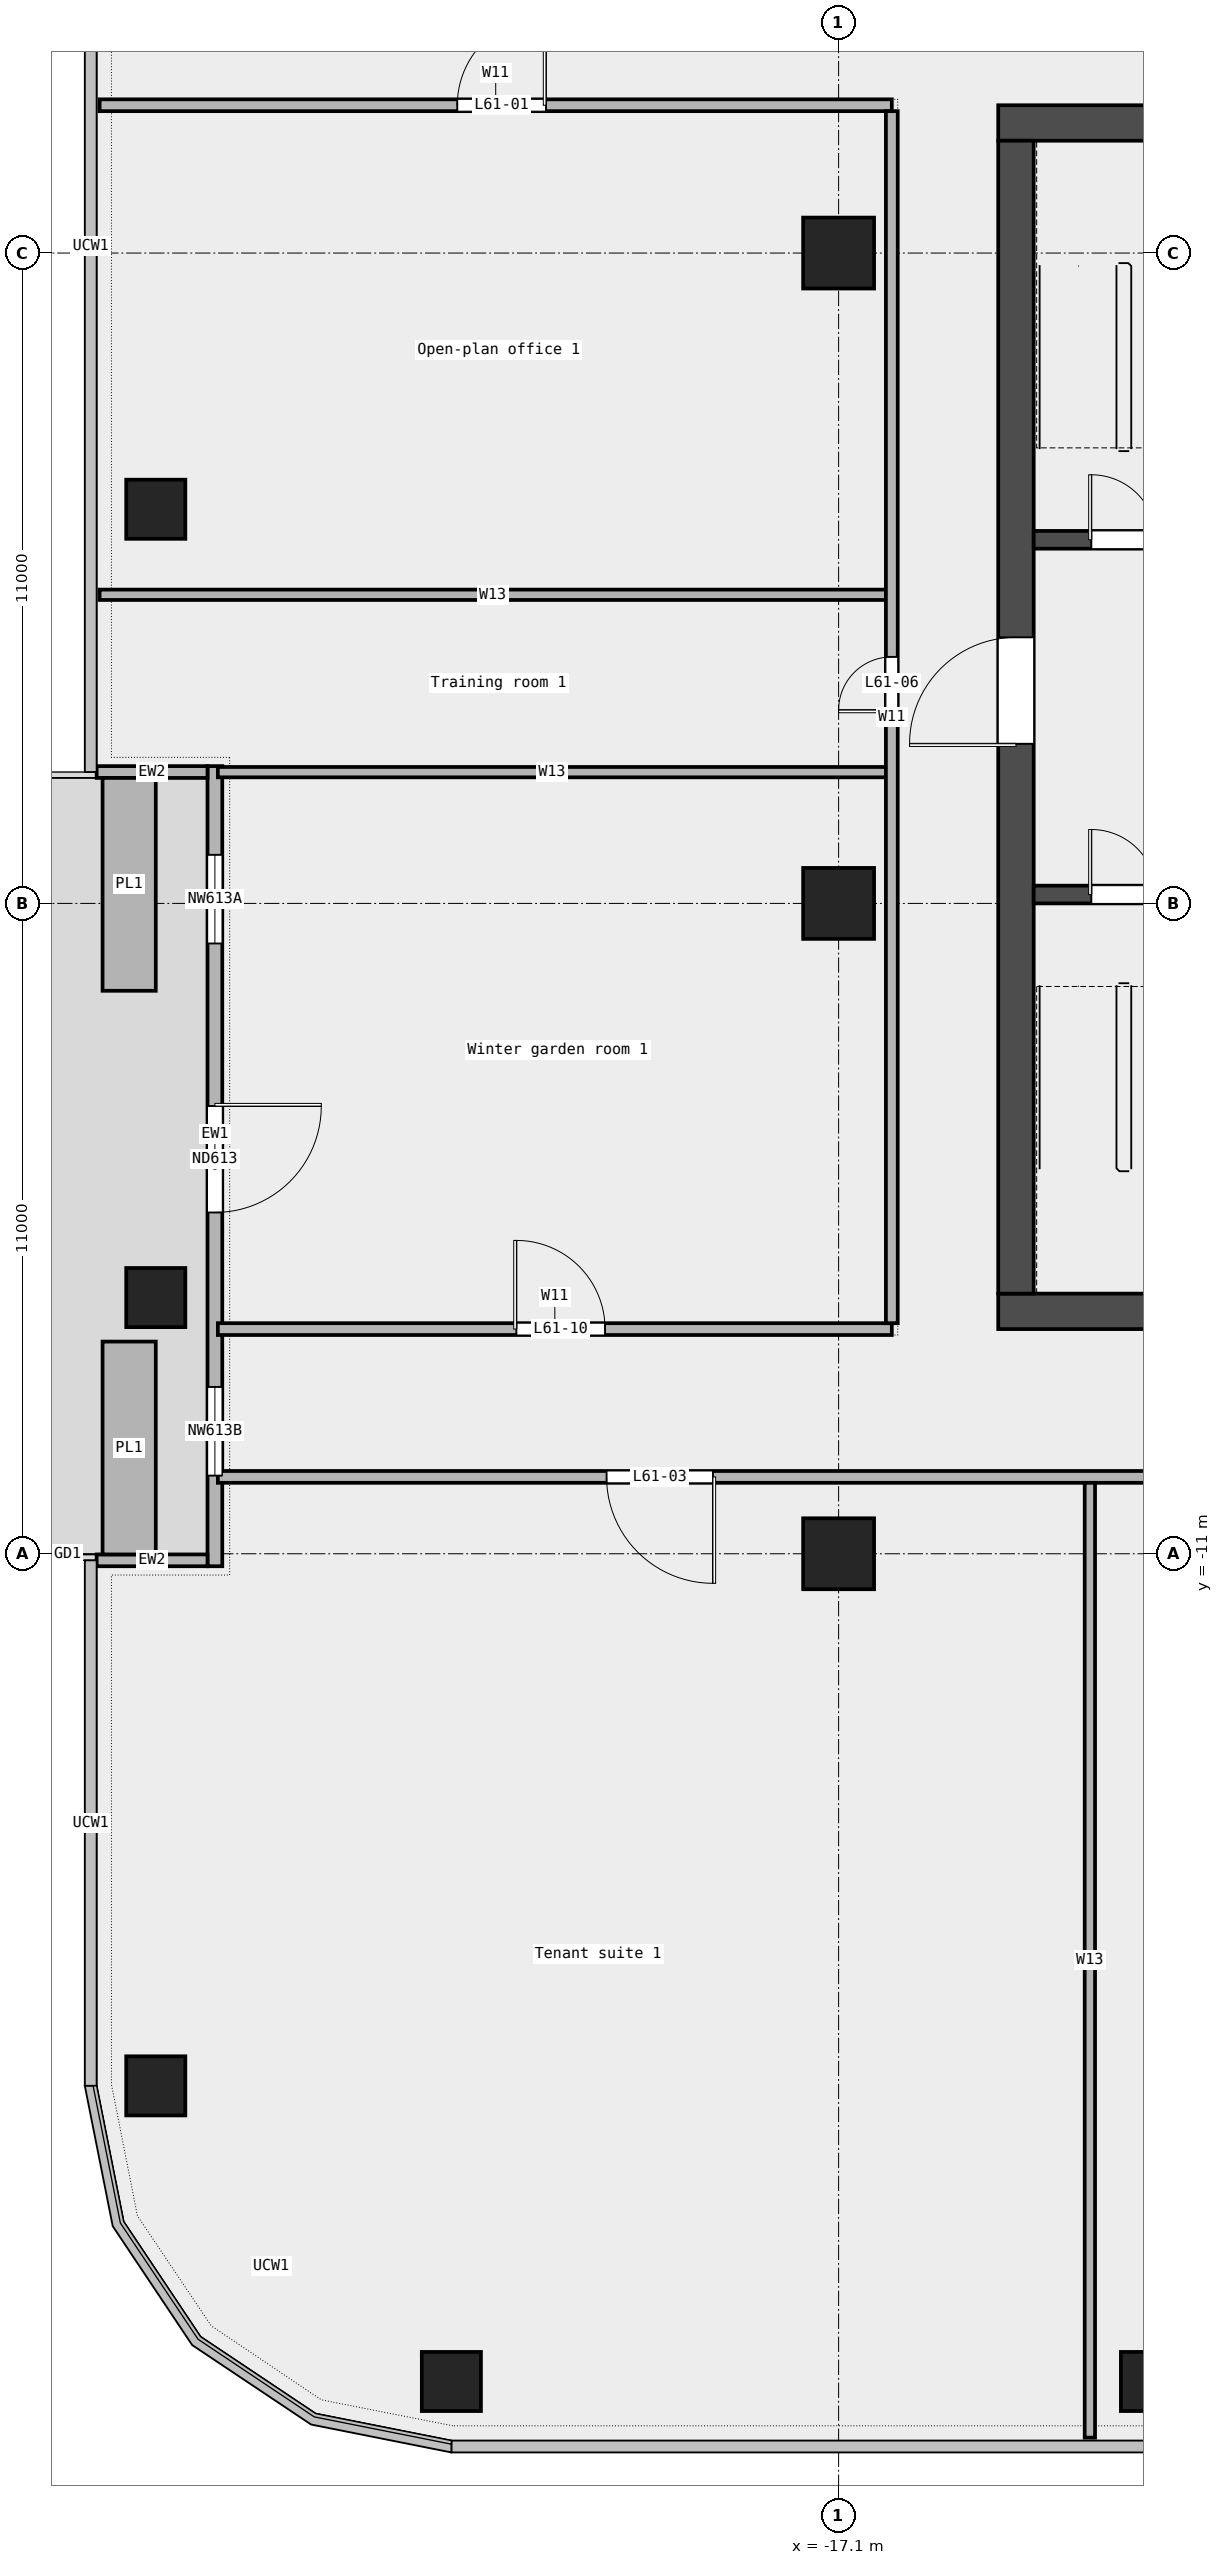
"""IFC4 building model, lengths in metres.
Left out: names, types, materials, properties, quantities, classifications, styles, units other than length and angle.
Written with IfcOpenShell. Run it as: python <this file> out.ifc"""

import sys

from ifc_helpers import new_model, si_unit, direction, frame, frame_2d, origin, origin_2d, place, context, subcontext, project, spatial, rectangle, extrude, element, fill, save


model = new_model("IFC4")
c1 = context("Model", 3, precision=1e-05, world=origin(), true_north=direction((0.0, 1.0)))
c2 = subcontext(c1, "Body", "Model", "MODEL_VIEW")
j1 = project(units=[si_unit("LENGTHUNIT", "METRE"), si_unit("PLANEANGLEUNIT", "RADIAN")], contexts=[c1])
p1 = place(None, origin())
s1 = spatial("IfcSite", under=j1, at=p1, CompositionType="ELEMENT")
p2 = place(p1, origin())
s2 = spatial("IfcBuilding", under=s1, at=p2, CompositionType="ELEMENT")
p3 = place(p2, frame((0.0, 0.0, 283.4)))
s3 = spatial("IfcBuildingStorey", under=s2, at=p3, CompositionType="ELEMENT", Elevation=283.4)
for number, where, z_axis, x_axis in (
    (1, (-23.65, -25.0, 0.0), (0.0, 0.0, 1.0), (1.0, 0.0, 0.0)),
    (2, (-11.825, -25.0, 0.0), (0.0, 0.0, 1.0), (1.0, 0.0, 0.0)),
    (3, (-28.65, 6.667, 0.0), (0.0, 0.0, 1.0), (1.0, 0.0, 0.0)),
    (4, (-28.65, -6.667, 0.0), (0.0, 0.0, 1.0), (1.0, 0.0, 0.0)),
    (5, (-28.65, -20.0, 0.0), (0.0, 0.0, 1.0), (1.0, 0.0, 0.0)),
):
    element("IfcColumn", number, at=place(p3, frame(where, z_axis=z_axis, x_axis=x_axis)), inside=s3, PredefinedType="COLUMN", context=c2, shape_type="SweptSolid", body=[
        extrude(rectangle(XDim=1.0, YDim=1.0, at=origin_2d()), origin(), (0.0, 0.0, 1.0), 3.6),
    ])
for number, where, z_axis, x_axis in (
    (6, (-17.1, -11.0, 0.0), (0.0, 0.0, 1.0), (1.0, 0.0, 0.0)),
    (7, (-17.1, 0.0, 0.0), (0.0, 0.0, 1.0), (1.0, 0.0, 0.0)),
    (8, (-17.1, 11.0, 0.0), (0.0, 0.0, 1.0), (1.0, 0.0, 0.0)),
):
    element("IfcColumn", number, at=place(p3, frame(where, z_axis=z_axis, x_axis=x_axis)), inside=s3, PredefinedType="COLUMN", context=c2, shape_type="SweptSolid", body=[
        extrude(rectangle(XDim=1.2, YDim=1.2, at=origin_2d()), origin(), (0.0, 0.0, 1.0), 3.6),
    ])
p4 = place(p3, frame((-27.65, 2.322, 0.0), z_axis=(0.0, 0.0, 1.0), x_axis=(0.0, -1.0, 0.0)))
e9 = element("IfcWall", 9, at=p4, inside=s3, PredefinedType="STANDARD", context=c2, shape_type="SweptSolid", body=[
    extrude(rectangle(XDim=13.533, YDim=0.25, at=frame_2d((6.767, 0.0))), origin(), (0.0, 0.0, 1.0), 3.6),
])
p5 = place(p4, frame((1.5, 0.0, 0.45)))
e10 = element("IfcOpeningElement", 10, at=p5, cuts=e9, PredefinedType="OPENING", context=c2, shape_type="SweptSolid", body=[
    extrude(rectangle(XDim=1.5, YDim=2.4, at=frame_2d((0.75, 1.2))), frame((0.0, 0.137, 0.0), z_axis=(0.0, -1.0, 0.0), x_axis=(1.0, 0.0, 0.0)), (0.0, 0.0, 1.0), 0.274),
])
p6 = place(p4, frame((5.75, 0.0, 0.0)))
e11 = element("IfcOpeningElement", 11, at=p6, cuts=e9, PredefinedType="OPENING", context=c2, shape_type="SweptSolid", body=[
    extrude(rectangle(XDim=1.8, YDim=2.4, at=frame_2d((0.9, 1.2))), frame((0.0, 0.137, 0.0), z_axis=(0.0, -1.0, 0.0), x_axis=(1.0, 0.0, 0.0)), (0.0, 0.0, 1.0), 0.274),
])
p7 = place(p4, frame((10.5, 0.0, 0.45)))
e12 = element("IfcOpeningElement", 12, at=p7, cuts=e9, PredefinedType="OPENING", context=c2, shape_type="SweptSolid", body=[
    extrude(rectangle(XDim=1.5, YDim=2.4, at=frame_2d((0.75, 1.2))), frame((0.0, 0.137, 0.0), z_axis=(0.0, -1.0, 0.0), x_axis=(1.0, 0.0, 0.0)), (0.0, 0.0, 1.0), 0.274),
])
for number, where, z_axis, x_axis in (
    (13, (-29.65, 2.222, 0.0), (0.0, 0.0, 1.0), (1.0, 0.0, 0.0)),
    (14, (-29.65, -11.111, 0.0), (0.0, 0.0, 1.0), (1.0, 0.0, 0.0)),
):
    element("IfcWall", number, at=place(p3, frame(where, z_axis=z_axis, x_axis=x_axis)), inside=s3, PredefinedType="STANDARD", context=c2, shape_type="SweptSolid", body=[
        extrude(rectangle(XDim=1.875, YDim=0.2, at=frame_2d((0.938, 0.0))), origin(), (0.0, 0.0, 1.0), 3.6),
    ])
for number, where, z_axis, x_axis in (
    (15, (-29.1, 2.122, 0.0), (0.0, 0.0, 1.0), (0.0, -1.0, 0.0)),
    (16, (-29.1, -7.411, 0.0), (0.0, 0.0, 1.0), (0.0, -1.0, 0.0)),
):
    element("IfcWall", number, at=place(p3, frame(where, z_axis=z_axis, x_axis=x_axis)), inside=s3, PredefinedType="STANDARD", context=c2, shape_type="SweptSolid", body=[
        extrude(rectangle(XDim=3.6, YDim=0.9, at=frame_2d((1.8, 0.0))), origin(), (0.0, 0.0, 1.0), 0.7),
    ])
p8 = place(p3, frame((-27.6, -9.7, 0.0), z_axis=(0.0, 0.0, 1.0), x_axis=(1.0, 0.0, 0.0)))
e17 = element("IfcWall", 17, at=p8, inside=s3, PredefinedType="PARTITIONING", context=c2, shape_type="SweptSolid", body=[
    extrude(rectangle(XDim=55.2, YDim=0.2, at=frame_2d((27.6, 0.0))), origin(), (0.0, 0.0, 1.0), 3.6),
])
p9 = place(p8, frame((6.575, 0.0, 0.0)))
e18 = element("IfcOpeningElement", 18, at=p9, cuts=e17, PredefinedType="OPENING", context=c2, shape_type="SweptSolid", body=[
    extrude(rectangle(XDim=1.8, YDim=2.1, at=frame_2d((0.9, 1.05))), frame((0.0, 0.112, 0.0), z_axis=(0.0, -1.0, 0.0), x_axis=(1.0, 0.0, 0.0)), (0.0, 0.0, 1.0), 0.224),
])
p10 = place(p8, frame((33.975, 0.0, 0.0)))
e19 = element("IfcOpeningElement", 19, at=p10, cuts=e17, PredefinedType="OPENING", context=c2, shape_type="SweptSolid", body=[
    extrude(rectangle(XDim=1.8, YDim=2.1, at=frame_2d((0.9, 1.05))), frame((0.0, 0.112, 0.0), z_axis=(0.0, -1.0, 0.0), x_axis=(1.0, 0.0, 0.0)), (0.0, 0.0, 1.0), 0.224),
])
p11 = place(p3, frame((-27.6, -7.2, 0.0), z_axis=(0.0, 0.0, 1.0), x_axis=(1.0, 0.0, 0.0)))
e20 = element("IfcWall", 20, at=p11, inside=s3, PredefinedType="PARTITIONING", context=c2, shape_type="SweptSolid", body=[
    extrude(rectangle(XDim=11.4, YDim=0.2, at=frame_2d((5.7, 0.0))), origin(), (0.0, 0.0, 1.0), 3.6),
])
p12 = place(p11, frame((5.05, 0.0, 0.0)))
e21 = element("IfcOpeningElement", 21, at=p12, cuts=e20, PredefinedType="OPENING", context=c2, shape_type="SweptSolid", body=[
    extrude(rectangle(XDim=1.5, YDim=2.1, at=frame_2d((0.75, 1.05))), frame((0.0, 0.112, 0.0), z_axis=(0.0, -1.0, 0.0), x_axis=(1.0, 0.0, 0.0)), (0.0, 0.0, 1.0), 0.224),
])
p13 = place(p3, frame((-27.6, 2.22, 0.0), z_axis=(0.0, 0.0, 1.0), x_axis=(1.0, 0.0, 0.0)))
e22 = element("IfcWall", 22, at=p13, inside=s3, PredefinedType="PARTITIONING", context=c2, shape_type="SweptSolid", body=[
    extrude(rectangle(XDim=11.3, YDim=0.175, at=frame_2d((5.65, 0.0))), origin(), (0.0, 0.0, 1.0), 3.6),
])
p14 = place(p3, frame((-29.6, 5.22, 0.0), z_axis=(0.0, 0.0, 1.0), x_axis=(1.0, 0.0, 0.0)))
e23 = element("IfcWall", 23, at=p14, inside=s3, PredefinedType="PARTITIONING", context=c2, shape_type="SweptSolid", body=[
    extrude(rectangle(XDim=13.3, YDim=0.175, at=frame_2d((6.65, 0.0))), origin(), (0.0, 0.0, 1.0), 3.6),
])
p15 = place(p3, frame((-29.6, 13.5, 0.0), z_axis=(0.0, 0.0, 1.0), x_axis=(1.0, 0.0, 0.0)))
e24 = element("IfcWall", 24, at=p15, inside=s3, PredefinedType="PARTITIONING", context=c2, shape_type="SweptSolid", body=[
    extrude(rectangle(XDim=13.4, YDim=0.2, at=frame_2d((6.7, 0.0))), origin(), (0.0, 0.0, 1.0), 3.6),
])
p16 = place(p15, frame((6.05, 0.0, 0.0)))
e25 = element("IfcOpeningElement", 25, at=p16, cuts=e24, PredefinedType="OPENING", context=c2, shape_type="SweptSolid", body=[
    extrude(rectangle(XDim=1.5, YDim=2.1, at=frame_2d((0.75, 1.05))), frame((0.0, 0.112, 0.0), z_axis=(0.0, -1.0, 0.0), x_axis=(1.0, 0.0, 0.0)), (0.0, 0.0, 1.0), 0.224),
])
p17 = place(p3, frame((-16.2, -7.1, 0.0), z_axis=(0.0, 0.0, 1.0), x_axis=(0.0, 1.0, 0.0)))
e26 = element("IfcWall", 26, at=p17, inside=s3, PredefinedType="PARTITIONING", context=c2, shape_type="SweptSolid", body=[
    extrude(rectangle(XDim=20.5, YDim=0.2, at=frame_2d((10.25, 0.0))), origin(), (0.0, 0.0, 1.0), 3.6),
])
p18 = place(p17, frame((10.37, 0.0, 0.0)))
e27 = element("IfcOpeningElement", 27, at=p18, cuts=e26, PredefinedType="OPENING", context=c2, shape_type="SweptSolid", body=[
    extrude(rectangle(XDim=0.9, YDim=2.1, at=frame_2d((0.45, 1.05))), frame((0.0, 0.112, 0.0), z_axis=(0.0, -1.0, 0.0), x_axis=(1.0, 0.0, 0.0)), (0.0, 0.0, 1.0), 0.224),
])
p19 = place(p3, frame((-12.85, -25.95, 0.0), z_axis=(0.0, 0.0, 1.0), x_axis=(0.0, 1.0, 0.0)))
e28 = element("IfcWall", 28, at=p19, inside=s3, PredefinedType="PARTITIONING", context=c2, shape_type="SweptSolid", body=[
    extrude(rectangle(XDim=16.15, YDim=0.175, at=frame_2d((8.075, 0.0))), origin(), (0.0, 0.0, 1.0), 3.6),
])
p20 = place(p3, frame((-14.4, -6.9, 0.0), z_axis=(0.0, 0.0, 1.0), x_axis=(1.0, 0.0, 0.0)))
e29 = element("IfcWall", 29, at=p20, inside=s3, PredefinedType="SHEAR", context=c2, shape_type="SweptSolid", body=[
    extrude(rectangle(XDim=28.8, YDim=0.6, at=frame_2d((14.4, 0.0))), origin(), (0.0, 0.0, 1.0), 3.7),
])
p21 = place(p20, frame((6.3, 0.0, 0.0)))
e30 = element("IfcOpeningElement", 30, at=p21, cuts=e29, PredefinedType="OPENING", context=c2, shape_type="SweptSolid", body=[
    extrude(rectangle(XDim=1.2, YDim=2.1, at=frame_2d((0.6, 1.05))), frame((0.0, 0.312, 0.0), z_axis=(0.0, -1.0, 0.0), x_axis=(1.0, 0.0, 0.0)), (0.0, 0.0, 1.0), 0.624),
])
p22 = place(p20, frame((11.462, 0.0, 0.0)))
e31 = element("IfcOpeningElement", 31, at=p22, cuts=e29, PredefinedType="OPENING", context=c2, shape_type="SweptSolid", body=[
    extrude(rectangle(XDim=1.0, YDim=2.1, at=frame_2d((0.5, 1.05))), frame((0.0, 0.312, 0.0), z_axis=(0.0, -1.0, 0.0), x_axis=(1.0, 0.0, 0.0)), (0.0, 0.0, 1.0), 0.624),
])
p23 = place(p20, frame((15.025, 0.0, 0.0)))
e32 = element("IfcOpeningElement", 32, at=p23, cuts=e29, PredefinedType="OPENING", context=c2, shape_type="SweptSolid", body=[
    extrude(rectangle(XDim=1.0, YDim=2.1, at=frame_2d((0.5, 1.05))), frame((0.0, 0.312, 0.0), z_axis=(0.0, -1.0, 0.0), x_axis=(1.0, 0.0, 0.0)), (0.0, 0.0, 1.0), 0.624),
])
p24 = place(p20, frame((18.75, 0.0, 0.0)))
e33 = element("IfcOpeningElement", 33, at=p24, cuts=e29, PredefinedType="OPENING", context=c2, shape_type="SweptSolid", body=[
    extrude(rectangle(XDim=1.8, YDim=2.1, at=frame_2d((0.9, 1.05))), frame((0.0, 0.312, 0.0), z_axis=(0.0, -1.0, 0.0), x_axis=(1.0, 0.0, 0.0)), (0.0, 0.0, 1.0), 0.624),
])
p25 = place(p20, frame((23.087, 0.0, 0.0)))
e34 = element("IfcOpeningElement", 34, at=p25, cuts=e29, PredefinedType="OPENING", context=c2, shape_type="SweptSolid", body=[
    extrude(rectangle(XDim=1.0, YDim=2.1, at=frame_2d((0.5, 1.05))), frame((0.0, 0.312, 0.0), z_axis=(0.0, -1.0, 0.0), x_axis=(1.0, 0.0, 0.0)), (0.0, 0.0, 1.0), 0.624),
])
p26 = place(p3, frame((-14.4, 13.2, 0.0), z_axis=(0.0, 0.0, 1.0), x_axis=(1.0, 0.0, 0.0)))
e35 = element("IfcWall", 35, at=p26, inside=s3, PredefinedType="SHEAR", context=c2, shape_type="SweptSolid", body=[
    extrude(rectangle(XDim=28.8, YDim=0.6, at=frame_2d((14.4, 0.0))), origin(), (0.0, 0.0, 1.0), 3.7),
])
p27 = place(p26, frame((6.3, 0.0, 0.0)))
e36 = element("IfcOpeningElement", 36, at=p27, cuts=e35, PredefinedType="OPENING", context=c2, shape_type="SweptSolid", body=[
    extrude(rectangle(XDim=1.2, YDim=2.1, at=frame_2d((0.6, 1.05))), frame((0.0, 0.312, 0.0), z_axis=(0.0, -1.0, 0.0), x_axis=(1.0, 0.0, 0.0)), (0.0, 0.0, 1.0), 0.624),
])
p28 = place(p26, frame((21.3, 0.0, 0.0)))
e37 = element("IfcOpeningElement", 37, at=p28, cuts=e35, PredefinedType="OPENING", context=c2, shape_type="SweptSolid", body=[
    extrude(rectangle(XDim=1.2, YDim=2.1, at=frame_2d((0.6, 1.05))), frame((0.0, 0.312, 0.0), z_axis=(0.0, -1.0, 0.0), x_axis=(1.0, 0.0, 0.0)), (0.0, 0.0, 1.0), 0.624),
])
p29 = place(p3, frame((-14.1, -6.6, 0.0), z_axis=(0.0, 0.0, 1.0), x_axis=(0.0, 1.0, 0.0)))
e38 = element("IfcWall", 38, at=p29, inside=s3, PredefinedType="SHEAR", context=c2, shape_type="SweptSolid", body=[
    extrude(rectangle(XDim=19.5, YDim=0.6, at=frame_2d((9.75, 0.0))), origin(), (0.0, 0.0, 1.0), 3.7),
])
p30 = place(p29, frame((9.3, 0.0, 0.0)))
e39 = element("IfcOpeningElement", 39, at=p30, cuts=e38, PredefinedType="OPENING", context=c2, shape_type="SweptSolid", body=[
    extrude(rectangle(XDim=1.8, YDim=2.1, at=frame_2d((0.9, 1.05))), frame((0.0, 0.312, 0.0), z_axis=(0.0, -1.0, 0.0), x_axis=(1.0, 0.0, 0.0)), (0.0, 0.0, 1.0), 0.624),
])
p31 = place(p3, frame((-13.8, 0.15, 0.0), z_axis=(0.0, 0.0, 1.0), x_axis=(1.0, 0.0, 0.0)))
e40 = element("IfcWall", 40, at=p31, inside=s3, PredefinedType="SOLIDWALL", context=c2, shape_type="SweptSolid", body=[
    extrude(rectangle(XDim=3.15, YDim=0.3, at=frame_2d((1.575, 0.0))), origin(), (0.0, 0.0, 1.0), 3.7),
])
p32 = place(p31, frame((0.975, 0.0, 0.0)))
e41 = element("IfcOpeningElement", 41, at=p32, cuts=e40, PredefinedType="OPENING", context=c2, shape_type="SweptSolid", body=[
    extrude(rectangle(XDim=1.1, YDim=2.1, at=frame_2d((0.55, 1.05))), frame((0.0, 0.162, 0.0), z_axis=(0.0, -1.0, 0.0), x_axis=(1.0, 0.0, 0.0)), (0.0, 0.0, 1.0), 0.324),
])
p33 = place(p3, frame((-13.8, 6.15, 0.0), z_axis=(0.0, 0.0, 1.0), x_axis=(1.0, 0.0, 0.0)))
e42 = element("IfcWall", 42, at=p33, inside=s3, PredefinedType="SOLIDWALL", context=c2, shape_type="SweptSolid", body=[
    extrude(rectangle(XDim=3.15, YDim=0.3, at=frame_2d((1.575, 0.0))), origin(), (0.0, 0.0, 1.0), 3.7),
])
p34 = place(p33, frame((0.975, 0.0, 0.0)))
e43 = element("IfcOpeningElement", 43, at=p34, cuts=e42, PredefinedType="OPENING", context=c2, shape_type="SweptSolid", body=[
    extrude(rectangle(XDim=1.1, YDim=2.1, at=frame_2d((0.55, 1.05))), frame((0.0, 0.162, 0.0), z_axis=(0.0, -1.0, 0.0), x_axis=(1.0, 0.0, 0.0)), (0.0, 0.0, 1.0), 0.324),
])
p35 = place(p5, origin())
e44 = element("IfcWindow", 44, at=p35, inside=s3, PartitioningType="SINGLE_PANEL", PredefinedType="WINDOW", context=c2, shape_type="SweptSolid", body=[
    extrude(rectangle(XDim=1.5, YDim=2.4, at=frame_2d((0.75, 1.2))), frame((0.0, 0.03, 0.0), z_axis=(0.0, -1.0, 0.0), x_axis=(1.0, 0.0, 0.0)), (0.0, 0.0, 1.0), 0.06),
])
fill(e10, e44)
p36 = place(p6, origin())
e45 = element("IfcDoor", 45, at=p36, inside=s3, OperationType="DOUBLE_DOOR_SINGLE_SWING", PredefinedType="DOOR", context=c2, shape_type="SweptSolid", body=[
    extrude(rectangle(XDim=1.8, YDim=2.4, at=frame_2d((0.9, 1.2))), frame((0.0, 0.025, 0.0), z_axis=(0.0, -1.0, 0.0), x_axis=(1.0, 0.0, 0.0)), (0.0, 0.0, 1.0), 0.05),
])
fill(e11, e45)
p37 = place(p7, origin())
e46 = element("IfcWindow", 46, at=p37, inside=s3, PartitioningType="SINGLE_PANEL", PredefinedType="WINDOW", context=c2, shape_type="SweptSolid", body=[
    extrude(rectangle(XDim=1.5, YDim=2.4, at=frame_2d((0.75, 1.2))), frame((0.0, 0.03, 0.0), z_axis=(0.0, -1.0, 0.0), x_axis=(1.0, 0.0, 0.0)), (0.0, 0.0, 1.0), 0.06),
])
fill(e12, e46)
p38 = place(p16, origin())
e47 = element("IfcDoor", 47, at=p38, inside=s3, OperationType="DOUBLE_DOOR_SINGLE_SWING", PredefinedType="DOOR", context=c2, shape_type="SweptSolid", body=[
    extrude(rectangle(XDim=1.5, YDim=2.1, at=frame_2d((0.75, 1.05))), frame((0.0, 0.025, 0.0), z_axis=(0.0, -1.0, 0.0), x_axis=(1.0, 0.0, 0.0)), (0.0, 0.0, 1.0), 0.05),
])
fill(e25, e47)
p39 = place(p9, origin())
e48 = element("IfcDoor", 48, at=p39, inside=s3, OperationType="DOUBLE_DOOR_SINGLE_SWING", PredefinedType="DOOR", context=c2, shape_type="SweptSolid", body=[
    extrude(rectangle(XDim=1.8, YDim=2.1, at=frame_2d((0.9, 1.05))), frame((0.0, 0.025, 0.0), z_axis=(0.0, -1.0, 0.0), x_axis=(1.0, 0.0, 0.0)), (0.0, 0.0, 1.0), 0.05),
])
fill(e18, e48)
p40 = place(p18, origin())
e49 = element("IfcDoor", 49, at=p40, inside=s3, OperationType="SINGLE_SWING_LEFT", PredefinedType="DOOR", context=c2, shape_type="SweptSolid", body=[
    extrude(rectangle(XDim=0.9, YDim=2.1, at=frame_2d((0.45, 1.05))), frame((0.0, 0.025, 0.0), z_axis=(0.0, -1.0, 0.0), x_axis=(1.0, 0.0, 0.0)), (0.0, 0.0, 1.0), 0.05),
])
fill(e27, e49)
p41 = place(p12, origin())
e50 = element("IfcDoor", 50, at=p41, inside=s3, OperationType="DOUBLE_DOOR_SINGLE_SWING", PredefinedType="DOOR", context=c2, shape_type="SweptSolid", body=[
    extrude(rectangle(XDim=1.5, YDim=2.1, at=frame_2d((0.75, 1.05))), frame((0.0, 0.025, 0.0), z_axis=(0.0, -1.0, 0.0), x_axis=(1.0, 0.0, 0.0)), (0.0, 0.0, 1.0), 0.05),
])
fill(e21, e50)
p42 = place(p32, origin())
e51 = element("IfcDoor", 51, at=p42, inside=s3, OperationType="SINGLE_SWING_LEFT", PredefinedType="DOOR", context=c2, shape_type="SweptSolid", body=[
    extrude(rectangle(XDim=1.1, YDim=2.1, at=frame_2d((0.55, 1.05))), frame((0.0, 0.025, 0.0), z_axis=(0.0, -1.0, 0.0), x_axis=(1.0, 0.0, 0.0)), (0.0, 0.0, 1.0), 0.05),
])
fill(e41, e51)
p43 = place(p34, origin())
e52 = element("IfcDoor", 52, at=p43, inside=s3, OperationType="SINGLE_SWING_LEFT", PredefinedType="DOOR", context=c2, shape_type="SweptSolid", body=[
    extrude(rectangle(XDim=1.1, YDim=2.1, at=frame_2d((0.55, 1.05))), frame((0.0, 0.025, 0.0), z_axis=(0.0, -1.0, 0.0), x_axis=(1.0, 0.0, 0.0)), (0.0, 0.0, 1.0), 0.05),
])
fill(e43, e52)
p44 = place(p30, origin())
e53 = element("IfcDoor", 53, at=p44, inside=s3, OperationType="DOUBLE_DOOR_SINGLE_SWING", PredefinedType="DOOR", context=c2, shape_type="SweptSolid", body=[
    extrude(rectangle(XDim=1.8, YDim=2.1, at=frame_2d((0.9, 1.05))), frame((0.0, 0.025, 0.0), z_axis=(0.0, -1.0, 0.0), x_axis=(1.0, 0.0, 0.0)), (0.0, 0.0, 1.0), 0.05),
])
fill(e39, e53)
save(model, sys.argv[1])
